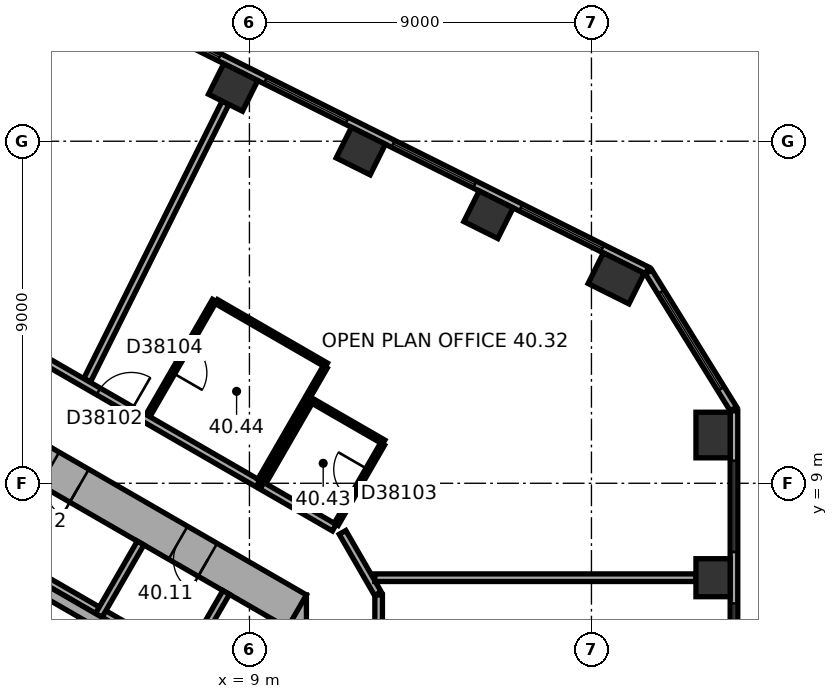
"""IFC4 building model, lengths in metres.
Left out: names, types, materials, properties, quantities, classifications, styles, units other than length and angle.
Written with IfcOpenShell. Run it as: python <this file> out.ifc"""

import sys

from ifc_helpers import new_model, si_unit, direction, frame, frame_2d, origin, origin_2d, place, context, subcontext, project, spatial, rectangle, extrude, element, fill, save


model = new_model("IFC4")
c1 = context("Model", 3, precision=1e-05, world=origin(), true_north=direction((0.0, 1.0)))
c2 = subcontext(c1, "Body", "Model", "MODEL_VIEW")
j1 = project(units=[si_unit("LENGTHUNIT", "METRE"), si_unit("PLANEANGLEUNIT", "RADIAN")], contexts=[c1])
p1 = place(None, origin())
s1 = spatial("IfcSite", under=j1, at=p1, CompositionType="ELEMENT")
p2 = place(p1, origin())
s2 = spatial("IfcBuilding", under=s1, at=p2, CompositionType="ELEMENT")
p3 = place(p2, frame((0.0, 0.0, 165.1)))
s3 = spatial("IfcBuildingStorey", under=s2, at=p3, CompositionType="ELEMENT", Elevation=165.1)
p4 = place(p3, frame((21.2, 6.515, 0.0), z_axis=(0.0, 0.0, 1.0), x_axis=(0.0, 1.0, 0.0)))
e1 = element("IfcColumn", 1, at=p4, inside=s3, PredefinedType="COLUMN", context=c2, shape_type="SweptSolid", body=[
    extrude(rectangle(XDim=1.0, YDim=0.9, at=origin_2d()), origin(), (0.0, 0.0, 1.0), 3.7),
])
for number, where, z_axis, x_axis in (
    (2, (21.2, 10.27, 0.0), (0.0, 0.0, 1.0), (0.0, 1.0, 0.0)),
    (3, (18.65, 14.39, 0.0), (0.0, 0.0, 1.0), (-0.895, 0.446, 0.0)),
):
    element("IfcColumn", number, at=place(p3, frame(where, z_axis=z_axis, x_axis=x_axis)), inside=s3, PredefinedType="COLUMN", context=c2, shape_type="SweptSolid", body=[
        extrude(rectangle(XDim=1.2, YDim=0.9, at=origin_2d()), origin(), (0.0, 0.0, 1.0), 3.7),
    ])
for number, where, z_axis, x_axis in (
    (4, (15.29, 16.065, 0.0), (0.0, 0.0, 1.0), (-0.895, 0.446, 0.0)),
    (5, (11.931, 17.74, 0.0), (0.0, 0.0, 1.0), (-0.895, 0.446, 0.0)),
    (6, (8.571, 19.416, 0.0), (0.0, 0.0, 1.0), (-0.895, 0.446, 0.0)),
):
    element("IfcColumn", number, at=place(p3, frame(where, z_axis=z_axis, x_axis=x_axis)), inside=s3, PredefinedType="COLUMN", context=c2, shape_type="SweptSolid", body=[
        extrude(rectangle(XDim=1.0, YDim=0.9, at=origin_2d()), origin(), (0.0, 0.0, 1.0), 3.7),
    ])
p5 = place(p3, frame((10.0, -6.062, 0.0), z_axis=(0.0, 0.0, 1.0), x_axis=(0.0, 1.0, 0.0)))
e7 = element("IfcWall", 7, at=p5, inside=s3, PredefinedType="SHEAR", context=c2, shape_type="SweptSolid", body=[
    extrude(rectangle(XDim=12.125, YDim=1.0, at=frame_2d((6.062, 0.0))), origin(), (0.0, 0.0, 1.0), 3.7),
])
p6 = place(p5, frame((6.262, 0.0, 0.0)))
e8 = element("IfcOpeningElement", 8, at=p6, cuts=e7, PredefinedType="OPENING", context=c2, shape_type="SweptSolid", body=[
    extrude(rectangle(XDim=1.5, YDim=2.1, at=frame_2d((0.75, 1.05))), frame((0.0, 0.51, 0.0), z_axis=(0.0, -1.0, 0.0), x_axis=(1.0, 0.0, 0.0)), (0.0, 0.0, 1.0), 1.02),
])
p7 = place(p5, frame((1.812, 0.0, 0.0)))
e9 = element("IfcOpeningElement", 9, at=p7, cuts=e7, PredefinedType="OPENING", context=c2, shape_type="SweptSolid", body=[
    extrude(rectangle(XDim=0.9, YDim=2.1, at=frame_2d((0.45, 1.05))), frame((0.0, 0.51, 0.0), z_axis=(0.0, -1.0, 0.0), x_axis=(1.0, 0.0, 0.0)), (0.0, 0.0, 1.0), 1.02),
])
p8 = place(p5, frame((4.412, 0.0, 0.0)))
e10 = element("IfcOpeningElement", 10, at=p8, cuts=e7, PredefinedType="OPENING", context=c2, shape_type="SweptSolid", body=[
    extrude(rectangle(XDim=0.9, YDim=2.1, at=frame_2d((0.45, 1.05))), frame((0.0, 0.51, 0.0), z_axis=(0.0, -1.0, 0.0), x_axis=(1.0, 0.0, 0.0)), (0.0, 0.0, 1.0), 1.02),
])
p9 = place(p3, frame((10.25, 5.629, 0.0), z_axis=(0.0, 0.0, 1.0), x_axis=(-0.866022616891, 0.50000482701, 0.0)))
e11 = element("IfcWall", 11, at=p9, inside=s3, PredefinedType="SHEAR", context=c2, shape_type="SweptSolid", body=[
    extrude(rectangle(XDim=12.125, YDim=1.0, at=frame_2d((6.062, 0.0))), origin(), (0.0, 0.0, 1.0), 3.7),
])
p10 = place(p9, frame((2.712, 0.0, 0.0)))
e12 = element("IfcOpeningElement", 12, at=p10, cuts=e11, PredefinedType="OPENING", context=c2, shape_type="SweptSolid", body=[
    extrude(rectangle(XDim=0.9, YDim=2.1, at=frame_2d((0.45, 1.05))), frame((0.0, 0.51, 0.0), z_axis=(0.0, -1.0, 0.0), x_axis=(1.0, 0.0, 0.0)), (0.0, 0.0, 1.0), 1.02),
])
p11 = place(p9, frame((6.612, 0.0, 0.0)))
e13 = element("IfcOpeningElement", 13, at=p11, cuts=e11, PredefinedType="OPENING", context=c2, shape_type="SweptSolid", body=[
    extrude(rectangle(XDim=0.9, YDim=2.1, at=frame_2d((0.45, 1.05))), frame((0.0, 0.51, 0.0), z_axis=(0.0, -1.0, 0.0), x_axis=(1.0, 0.0, 0.0)), (0.0, 0.0, 1.0), 1.02),
])
p12 = place(p3, frame((21.75, -9.138, 0.0), z_axis=(0.0, 0.0, 1.0), x_axis=(0.0, 1.0, 0.0)))
e14 = element("IfcWall", 14, at=p12, inside=s3, PredefinedType="STANDARD", context=c2, shape_type="SweptSolid", body=[
    extrude(rectangle(XDim=20.044, YDim=0.2, at=frame_2d((10.022, 0.0))), origin(), (0.0, 0.0, 1.0), 3.7),
])
p13 = place(p12, frame((1.314, 0.0, 0.9)))
e15 = element("IfcOpeningElement", 15, at=p13, cuts=e14, PredefinedType="OPENING", context=c2, shape_type="SweptSolid", body=[
    extrude(rectangle(XDim=2.4, YDim=2.0, at=frame_2d((1.2, 1.0))), frame((0.0, 0.11, 0.0), z_axis=(0.0, -1.0, 0.0), x_axis=(1.0, 0.0, 0.0)), (0.0, 0.0, 1.0), 0.22),
])
p14 = place(p12, frame((5.069, 0.0, 0.9)))
e16 = element("IfcOpeningElement", 16, at=p14, cuts=e14, PredefinedType="OPENING", context=c2, shape_type="SweptSolid", body=[
    extrude(rectangle(XDim=2.4, YDim=2.0, at=frame_2d((1.2, 1.0))), frame((0.0, 0.11, 0.0), z_axis=(0.0, -1.0, 0.0), x_axis=(1.0, 0.0, 0.0)), (0.0, 0.0, 1.0), 0.22),
])
p15 = place(p12, frame((8.823, 0.0, 0.9)))
e17 = element("IfcOpeningElement", 17, at=p15, cuts=e14, PredefinedType="OPENING", context=c2, shape_type="SweptSolid", body=[
    extrude(rectangle(XDim=2.4, YDim=2.0, at=frame_2d((1.2, 1.0))), frame((0.0, 0.11, 0.0), z_axis=(0.0, -1.0, 0.0), x_axis=(1.0, 0.0, 0.0)), (0.0, 0.0, 1.0), 0.22),
])
p16 = place(p12, frame((12.577, 0.0, 0.9)))
e18 = element("IfcOpeningElement", 18, at=p16, cuts=e14, PredefinedType="OPENING", context=c2, shape_type="SweptSolid", body=[
    extrude(rectangle(XDim=2.4, YDim=2.0, at=frame_2d((1.2, 1.0))), frame((0.0, 0.11, 0.0), z_axis=(0.0, -1.0, 0.0), x_axis=(1.0, 0.0, 0.0)), (0.0, 0.0, 1.0), 0.22),
])
p17 = place(p12, frame((16.331, 0.0, 0.9)))
e19 = element("IfcOpeningElement", 19, at=p17, cuts=e14, PredefinedType="OPENING", context=c2, shape_type="SweptSolid", body=[
    extrude(rectangle(XDim=2.4, YDim=2.0, at=frame_2d((1.2, 1.0))), frame((0.0, 0.11, 0.0), z_axis=(0.0, -1.0, 0.0), x_axis=(1.0, 0.0, 0.0)), (0.0, 0.0, 1.0), 0.22),
])
p18 = place(p3, frame((21.735, 10.958, 0.0), z_axis=(0.0, 0.0, 1.0), x_axis=(-0.526213807775, 0.850352296702, 0.0)))
e20 = element("IfcWall", 20, at=p18, inside=s3, PredefinedType="STANDARD", context=c2, shape_type="SweptSolid", body=[
    extrude(rectangle(XDim=4.238, YDim=0.2, at=frame_2d((2.119, 0.0))), origin(), (0.0, 0.0, 1.0), 3.7),
])
p19 = place(p18, frame((0.619, 0.0, 0.9)))
e21 = element("IfcOpeningElement", 21, at=p19, cuts=e20, PredefinedType="OPENING", context=c2, shape_type="SweptSolid", body=[
    extrude(rectangle(XDim=3.0, YDim=2.0, at=frame_2d((1.5, 1.0))), frame((0.0, 0.11, 0.0), z_axis=(0.0, -1.0, 0.0), x_axis=(1.0, 0.0, 0.0)), (0.0, 0.0, 1.0), 0.22),
])
p20 = place(p3, frame((19.464, 14.599, 0.0), z_axis=(0.0, 0.0, 1.0), x_axis=(-0.894935755043, 0.446195018289, 0.0)))
e22 = element("IfcWall", 22, at=p20, inside=s3, PredefinedType="STANDARD", context=c2, shape_type="SweptSolid", body=[
    extrude(rectangle(XDim=20.044, YDim=0.2, at=frame_2d((10.022, 0.0))), origin(), (0.0, 0.0, 1.0), 3.7),
])
p21 = place(p20, frame((1.313, 0.0, 0.9)))
e23 = element("IfcOpeningElement", 23, at=p21, cuts=e22, PredefinedType="OPENING", context=c2, shape_type="SweptSolid", body=[
    extrude(rectangle(XDim=2.4, YDim=2.0, at=frame_2d((1.2, 1.0))), frame((0.0, 0.11, 0.0), z_axis=(0.0, -1.0, 0.0), x_axis=(1.0, 0.0, 0.0)), (0.0, 0.0, 1.0), 0.22),
])
p22 = place(p20, frame((5.067, 0.0, 0.9)))
e24 = element("IfcOpeningElement", 24, at=p22, cuts=e22, PredefinedType="OPENING", context=c2, shape_type="SweptSolid", body=[
    extrude(rectangle(XDim=2.4, YDim=2.0, at=frame_2d((1.2, 1.0))), frame((0.0, 0.11, 0.0), z_axis=(0.0, -1.0, 0.0), x_axis=(1.0, 0.0, 0.0)), (0.0, 0.0, 1.0), 0.22),
])
p23 = place(p20, frame((8.821, 0.0, 0.9)))
e25 = element("IfcOpeningElement", 25, at=p23, cuts=e22, PredefinedType="OPENING", context=c2, shape_type="SweptSolid", body=[
    extrude(rectangle(XDim=2.4, YDim=2.0, at=frame_2d((1.2, 1.0))), frame((0.0, 0.11, 0.0), z_axis=(0.0, -1.0, 0.0), x_axis=(1.0, 0.0, 0.0)), (0.0, 0.0, 1.0), 0.22),
])
p24 = place(p20, frame((12.575, 0.0, 0.9)))
e26 = element("IfcOpeningElement", 26, at=p24, cuts=e22, PredefinedType="OPENING", context=c2, shape_type="SweptSolid", body=[
    extrude(rectangle(XDim=2.4, YDim=2.0, at=frame_2d((1.2, 1.0))), frame((0.0, 0.11, 0.0), z_axis=(0.0, -1.0, 0.0), x_axis=(1.0, 0.0, 0.0)), (0.0, 0.0, 1.0), 0.22),
])
p25 = place(p20, frame((16.329, 0.0, 0.9)))
e27 = element("IfcOpeningElement", 27, at=p25, cuts=e22, PredefinedType="OPENING", context=c2, shape_type="SweptSolid", body=[
    extrude(rectangle(XDim=2.4, YDim=2.0, at=frame_2d((1.2, 1.0))), frame((0.0, 0.11, 0.0), z_axis=(0.0, -1.0, 0.0), x_axis=(1.0, 0.0, 0.0)), (0.0, 0.0, 1.0), 0.22),
])
p26 = place(p3, frame((7.424, 4.259, 0.0), z_axis=(0.0, 0.0, 1.0), x_axis=(-0.866026010844, 0.49999894854, 0.0)))
e28 = element("IfcWall", 28, at=p26, inside=s3, PredefinedType="PARTITIONING", context=c2, shape_type="SweptSolid", body=[
    extrude(rectangle(XDim=8.0, YDim=0.2, at=frame_2d((4.0, 0.0))), origin(), (0.0, 0.0, 1.0), 3.42),
])
for number, where, z_axis, x_axis in (
    (29, (7.287, 4.222, 0.0), (0.0, 0.0, 1.0), (0.5, 0.866, 0.0)),
    (30, (5.036, 5.522, 0.0), (0.0, 0.0, 1.0), (0.5, 0.866, 0.0)),
):
    element("IfcWall", number, at=place(p3, frame(where, z_axis=z_axis, x_axis=x_axis)), inside=s3, PredefinedType="PARTITIONING", context=c2, shape_type="SweptSolid", body=[
        extrude(rectangle(XDim=2.2, YDim=0.2, at=frame_2d((1.1, 0.0))), origin(), (0.0, 0.0, 1.0), 3.42),
    ])
p27 = place(p3, frame((6.303, 4.617, 0.0), z_axis=(0.0, 0.0, 1.0), x_axis=(-0.866027801685, 0.499995846692, 0.0)))
e31 = element("IfcWall", 31, at=p27, inside=s3, PredefinedType="SHEAR", context=c2, shape_type="SweptSolid", body=[
    extrude(rectangle(XDim=7.06, YDim=0.3, at=frame_2d((3.53, 0.0))), origin(), (0.0, 0.0, 1.0), 3.42),
])
p28 = place(p3, frame((6.33, 10.779, 0.0), z_axis=(0.0, 0.0, 1.0), x_axis=(0.500010275428, 0.866019471182, 0.0)))
e32 = element("IfcWall", 32, at=p28, inside=s3, PredefinedType="PARTITIONING", context=c2, shape_type="SweptSolid", body=[
    extrude(rectangle(XDim=3.5, YDim=0.12, at=frame_2d((1.75, 0.0))), origin(), (0.0, 0.0, 1.0), 3.42),
])
p29 = place(p28, frame((1.3, 0.0, 0.0)))
e33 = element("IfcOpeningElement", 33, at=p29, cuts=e32, PredefinedType="OPENING", context=c2, shape_type="SweptSolid", body=[
    extrude(rectangle(XDim=0.9, YDim=2.1, at=frame_2d((0.45, 1.05))), frame((0.0, 0.07, 0.0), z_axis=(0.0, -1.0, 0.0), x_axis=(1.0, 0.0, 0.0)), (0.0, 0.0, 1.0), 0.14),
])
p30 = place(p3, frame((8.132, 13.78, 0.0), z_axis=(0.0, 0.0, 1.0), x_axis=(0.866039519639, -0.499975549825, 0.0)))
e34 = element("IfcWall", 34, at=p30, inside=s3, PredefinedType="PARTITIONING", context=c2, shape_type="SweptSolid", body=[
    extrude(rectangle(XDim=3.34, YDim=0.12, at=frame_2d((1.67, 0.0))), origin(), (0.0, 0.0, 1.0), 3.42),
])
p31 = place(p3, frame((8.37, 19.013, 0.0), z_axis=(0.0, 0.0, 1.0), x_axis=(-0.446183598632, -0.894941448538, 0.0)))
e35 = element("IfcWall", 35, at=p31, inside=s3, PredefinedType="PARTITIONING", context=c2, shape_type="SweptSolid", body=[
    extrude(rectangle(XDim=8.156, YDim=0.2, at=frame_2d((4.078, 0.0))), origin(), (0.0, 0.0, 1.0), 3.42),
])
p32 = place(p3, frame((9.224, 8.993, 0.0), z_axis=(0.0, 0.0, 1.0), x_axis=(-0.866031754707, 0.499988999718, 0.0)))
e36 = element("IfcWall", 36, at=p32, inside=s3, PredefinedType="PARTITIONING", context=c2, shape_type="SweptSolid", body=[
    extrude(rectangle(XDim=9.514, YDim=0.2, at=frame_2d((4.757, 0.0))), origin(), (0.0, 0.0, 1.0), 3.42),
])
p33 = place(p32, frame((3.848, 0.0, 0.0)))
e37 = element("IfcOpeningElement", 37, at=p33, cuts=e36, PredefinedType="OPENING", context=c2, shape_type="SweptSolid", body=[
    extrude(rectangle(XDim=1.0, YDim=2.1, at=frame_2d((0.5, 1.05))), frame((0.0, 0.11, 0.0), z_axis=(0.0, -1.0, 0.0), x_axis=(1.0, 0.0, 0.0)), (0.0, 0.0, 1.0), 0.22),
])
p34 = place(p3, frame((9.378, 9.019, 0.0), z_axis=(0.0, 0.0, 1.0), x_axis=(0.500004234368, 0.866022959057, 0.0)))
e38 = element("IfcWall", 38, at=p34, inside=s3, PredefinedType="PARTITIONING", context=c2, shape_type="SweptSolid", body=[
    extrude(rectangle(XDim=2.5, YDim=0.12, at=frame_2d((1.25, 0.0))), origin(), (0.0, 0.0, 1.0), 3.42),
])
p35 = place(p3, frame((10.68, 11.154, 0.0), z_axis=(0.0, 0.0, 1.0), x_axis=(0.86600889856, -0.500028586798, 0.0)))
e39 = element("IfcWall", 39, at=p35, inside=s3, PredefinedType="PARTITIONING", context=c2, shape_type="SweptSolid", body=[
    extrude(rectangle(XDim=2.14, YDim=0.12, at=frame_2d((1.07, 0.0))), origin(), (0.0, 0.0, 1.0), 3.42),
])
p36 = place(p3, frame((10.994, 12.058, 0.0), z_axis=(0.0, 0.0, 1.0), x_axis=(-0.500009156386, -0.866020117278, 0.0)))
e40 = element("IfcWall", 40, at=p36, inside=s3, PredefinedType="PARTITIONING", context=c2, shape_type="SweptSolid", body=[
    extrude(rectangle(XDim=3.44, YDim=0.12, at=frame_2d((1.72, 0.0))), origin(), (0.0, 0.0, 1.0), 3.42),
])
p37 = place(p3, frame((11.233, 7.833, 0.0), z_axis=(0.0, 0.0, 1.0), x_axis=(-0.866008176907, 0.50002983664, 0.0)))
e41 = element("IfcWall", 41, at=p37, inside=s3, PredefinedType="PARTITIONING", context=c2, shape_type="SweptSolid", body=[
    extrude(rectangle(XDim=2.2, YDim=0.2, at=frame_2d((1.1, 0.0))), origin(), (0.0, 0.0, 1.0), 3.42),
])
p38 = place(p3, frame((12.38, 6.097, 0.0), z_axis=(0.0, 0.0, 1.0), x_axis=(-0.499964847546, 0.866045698112, 0.0)))
e42 = element("IfcWall", 42, at=p38, inside=s3, PredefinedType="PARTITIONING", context=c2, shape_type="SweptSolid", body=[
    extrude(rectangle(XDim=1.86, YDim=0.2, at=frame_2d((0.93, 0.0))), origin(), (0.0, 0.0, 1.0), 3.42),
])
p39 = place(p3, frame((12.4, 2.761, 0.0), z_axis=(0.0, 0.0, 1.0), x_axis=(0.0, 1.0, 0.0)))
e43 = element("IfcWall", 43, at=p39, inside=s3, PredefinedType="PARTITIONING", context=c2, shape_type="SweptSolid", body=[
    extrude(rectangle(XDim=3.301, YDim=0.2, at=frame_2d((1.65, 0.0))), origin(), (0.0, 0.0, 1.0), 3.42),
])
p40 = place(p3, frame((12.503, 10.032, 0.0), z_axis=(0.0, 0.0, 1.0), x_axis=(-0.500002508028, -0.866023955769, 0.0)))
e44 = element("IfcWall", 44, at=p40, inside=s3, PredefinedType="PARTITIONING", context=c2, shape_type="SweptSolid", body=[
    extrude(rectangle(XDim=2.44, YDim=0.12, at=frame_2d((1.22, 0.0))), origin(), (0.0, 0.0, 1.0), 3.42),
])
p41 = place(p40, frame((0.77, 0.0, 0.0)))
e45 = element("IfcOpeningElement", 45, at=p41, cuts=e44, PredefinedType="OPENING", context=c2, shape_type="SweptSolid", body=[
    extrude(rectangle(XDim=0.9, YDim=2.1, at=frame_2d((0.45, 1.05))), frame((0.0, 0.07, 0.0), z_axis=(0.0, -1.0, 0.0), x_axis=(1.0, 0.0, 0.0)), (0.0, 0.0, 1.0), 0.14),
])
p42 = place(p3, frame((20.75, 6.515, 0.0), z_axis=(0.0, 0.0, 1.0), x_axis=(-1.0, 0.0, 0.0)))
e46 = element("IfcWall", 46, at=p42, inside=s3, PredefinedType="PARTITIONING", context=c2, shape_type="SweptSolid", body=[
    extrude(rectangle(XDim=8.452, YDim=0.2, at=frame_2d((4.226, 0.0))), origin(), (0.0, 0.0, 1.0), 3.42),
])
p43 = place(p16, origin())
e47 = element("IfcWindow", 47, at=p43, inside=s3, PartitioningType="SINGLE_PANEL", PredefinedType="WINDOW", context=c2, shape_type="SweptSolid", body=[
    extrude(rectangle(XDim=2.4, YDim=2.0, at=frame_2d((1.2, 1.0))), frame((0.0, 0.03, 0.0), z_axis=(0.0, -1.0, 0.0), x_axis=(1.0, 0.0, 0.0)), (0.0, 0.0, 1.0), 0.06),
])
fill(e18, e47)
p44 = place(p17, origin())
e48 = element("IfcWindow", 48, at=p44, inside=s3, PartitioningType="SINGLE_PANEL", PredefinedType="WINDOW", context=c2, shape_type="SweptSolid", body=[
    extrude(rectangle(XDim=2.4, YDim=2.0, at=frame_2d((1.2, 1.0))), frame((0.0, 0.03, 0.0), z_axis=(0.0, -1.0, 0.0), x_axis=(1.0, 0.0, 0.0)), (0.0, 0.0, 1.0), 0.06),
])
fill(e19, e48)
p45 = place(p19, origin())
e49 = element("IfcWindow", 49, at=p45, inside=s3, PartitioningType="SINGLE_PANEL", PredefinedType="WINDOW", context=c2, shape_type="SweptSolid", body=[
    extrude(rectangle(XDim=3.0, YDim=2.0, at=frame_2d((1.5, 1.0))), frame((0.0, 0.03, 0.0), z_axis=(0.0, -1.0, 0.0), x_axis=(1.0, 0.0, 0.0)), (0.0, 0.0, 1.0), 0.06),
])
fill(e21, e49)
p46 = place(p21, origin())
e50 = element("IfcWindow", 50, at=p46, inside=s3, PartitioningType="SINGLE_PANEL", PredefinedType="WINDOW", context=c2, shape_type="SweptSolid", body=[
    extrude(rectangle(XDim=2.4, YDim=2.0, at=frame_2d((1.2, 1.0))), frame((0.0, 0.03, 0.0), z_axis=(0.0, -1.0, 0.0), x_axis=(1.0, 0.0, 0.0)), (0.0, 0.0, 1.0), 0.06),
])
fill(e23, e50)
p47 = place(p22, origin())
e51 = element("IfcWindow", 51, at=p47, inside=s3, PartitioningType="SINGLE_PANEL", PredefinedType="WINDOW", context=c2, shape_type="SweptSolid", body=[
    extrude(rectangle(XDim=2.4, YDim=2.0, at=frame_2d((1.2, 1.0))), frame((0.0, 0.03, 0.0), z_axis=(0.0, -1.0, 0.0), x_axis=(1.0, 0.0, 0.0)), (0.0, 0.0, 1.0), 0.06),
])
fill(e24, e51)
p48 = place(p23, origin())
e52 = element("IfcWindow", 52, at=p48, inside=s3, PartitioningType="SINGLE_PANEL", PredefinedType="WINDOW", context=c2, shape_type="SweptSolid", body=[
    extrude(rectangle(XDim=2.4, YDim=2.0, at=frame_2d((1.2, 1.0))), frame((0.0, 0.03, 0.0), z_axis=(0.0, -1.0, 0.0), x_axis=(1.0, 0.0, 0.0)), (0.0, 0.0, 1.0), 0.06),
])
fill(e25, e52)
p49 = place(p24, origin())
e53 = element("IfcWindow", 53, at=p49, inside=s3, PartitioningType="SINGLE_PANEL", PredefinedType="WINDOW", context=c2, shape_type="SweptSolid", body=[
    extrude(rectangle(XDim=2.4, YDim=2.0, at=frame_2d((1.2, 1.0))), frame((0.0, 0.03, 0.0), z_axis=(0.0, -1.0, 0.0), x_axis=(1.0, 0.0, 0.0)), (0.0, 0.0, 1.0), 0.06),
])
fill(e26, e53)
p50 = place(p10, origin())
e54 = element("IfcDoor", 54, at=p50, inside=s3, OperationType="SINGLE_SWING_LEFT", PredefinedType="DOOR", context=c2, shape_type="SweptSolid", body=[
    extrude(rectangle(XDim=0.9, YDim=2.1, at=frame_2d((0.45, 1.05))), frame((0.0, 0.025, 0.0), z_axis=(0.0, -1.0, 0.0), x_axis=(1.0, 0.0, 0.0)), (0.0, 0.0, 1.0), 0.05),
])
fill(e12, e54)
p51 = place(p11, origin())
e55 = element("IfcDoor", 55, at=p51, inside=s3, OperationType="SINGLE_SWING_LEFT", PredefinedType="DOOR", context=c2, shape_type="SweptSolid", body=[
    extrude(rectangle(XDim=0.9, YDim=2.1, at=frame_2d((0.45, 1.05))), frame((0.0, 0.025, 0.0), z_axis=(0.0, -1.0, 0.0), x_axis=(1.0, 0.0, 0.0)), (0.0, 0.0, 1.0), 0.05),
])
fill(e13, e55)
p52 = place(p33, origin())
e56 = element("IfcDoor", 56, at=p52, inside=s3, OperationType="SINGLE_SWING_LEFT", PredefinedType="DOOR", context=c2, shape_type="SweptSolid", body=[
    extrude(rectangle(XDim=1.0, YDim=2.1, at=frame_2d((0.5, 1.05))), frame((0.0, 0.025, 0.0), z_axis=(0.0, -1.0, 0.0), x_axis=(1.0, 0.0, 0.0)), (0.0, 0.0, 1.0), 0.05),
])
fill(e37, e56)
p53 = place(p41, origin())
e57 = element("IfcDoor", 57, at=p53, inside=s3, OperationType="SINGLE_SWING_LEFT", PredefinedType="DOOR", context=c2, shape_type="SweptSolid", body=[
    extrude(rectangle(XDim=0.9, YDim=2.1, at=frame_2d((0.45, 1.05))), frame((0.0, 0.025, 0.0), z_axis=(0.0, -1.0, 0.0), x_axis=(1.0, 0.0, 0.0)), (0.0, 0.0, 1.0), 0.05),
])
fill(e45, e57)
p54 = place(p29, origin())
e58 = element("IfcDoor", 58, at=p54, inside=s3, OperationType="SINGLE_SWING_LEFT", PredefinedType="DOOR", context=c2, shape_type="SweptSolid", body=[
    extrude(rectangle(XDim=0.9, YDim=2.1, at=frame_2d((0.45, 1.05))), frame((0.0, 0.025, 0.0), z_axis=(0.0, -1.0, 0.0), x_axis=(1.0, 0.0, 0.0)), (0.0, 0.0, 1.0), 0.05),
])
fill(e33, e58)
save(model, sys.argv[1])
